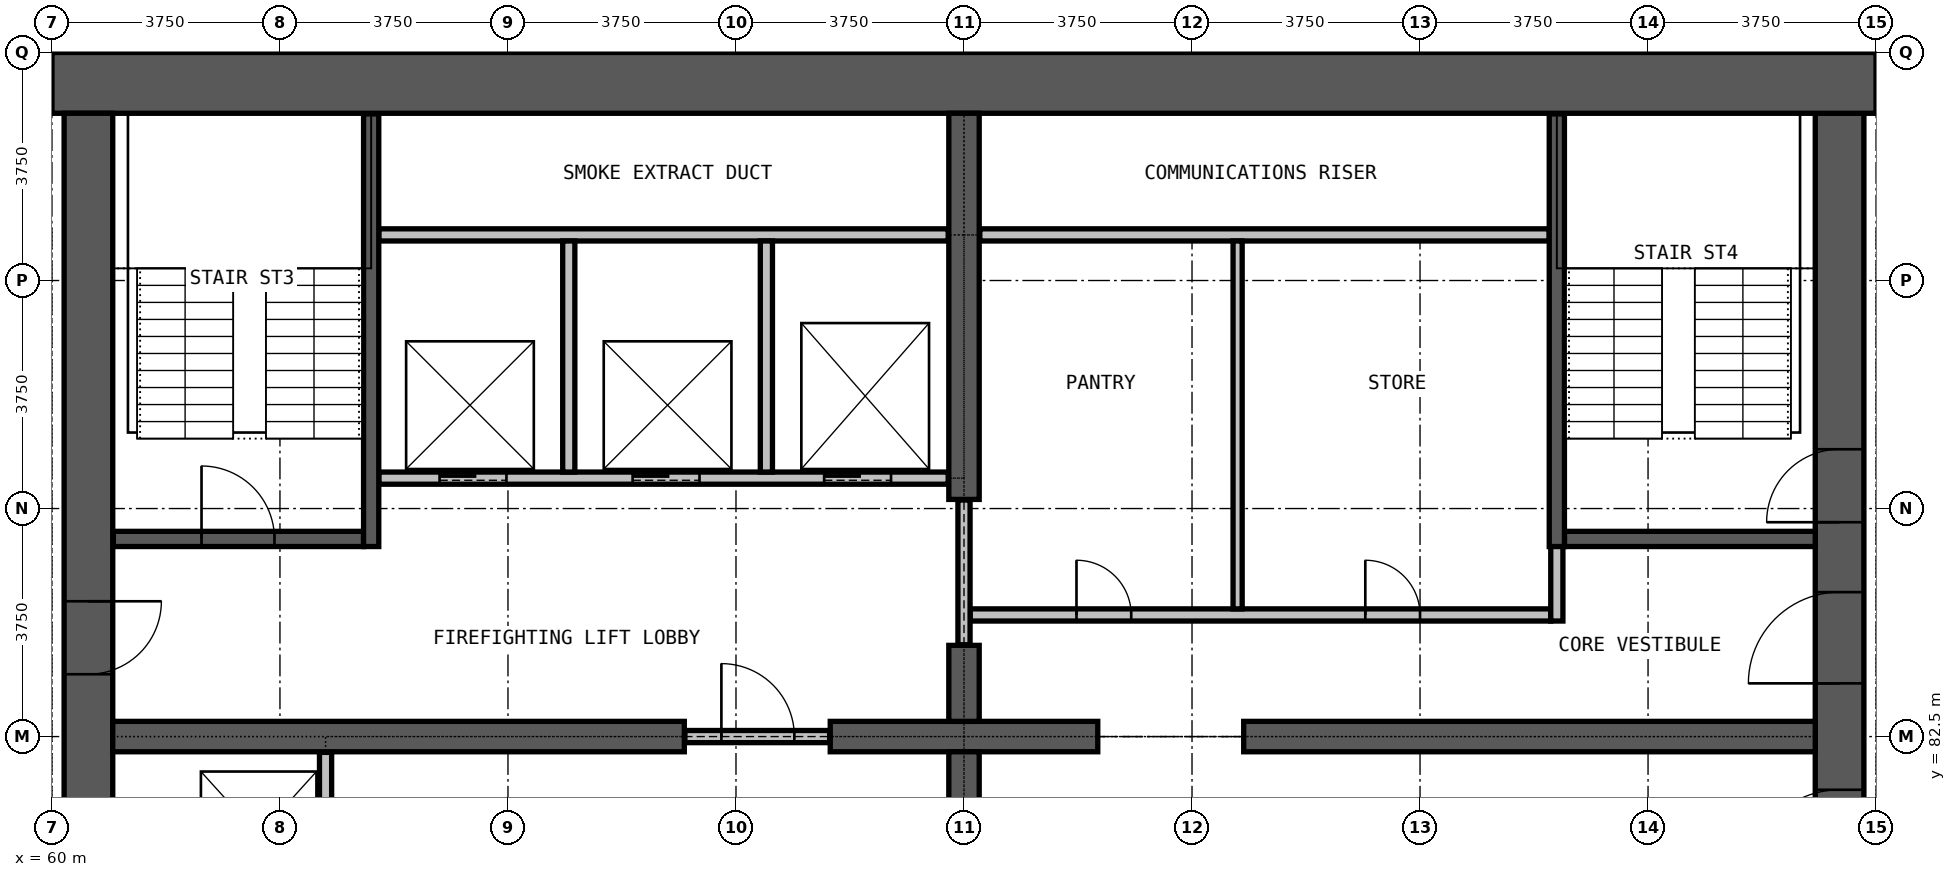
"""IFC4 building model, lengths in metres.
Left out: names, types, materials, properties, quantities, classifications, styles, units other than length and angle.
Written with IfcOpenShell. Run it as: python <this file> out.ifc"""

import sys

from ifc_helpers import new_model, si_unit, direction, frame, frame_2d, origin, place, context, subcontext, project, spatial, rectangle, extrude, element, fill, save


model = new_model("IFC4")
c1 = context("Model", 3, precision=1e-05, world=origin(), true_north=direction((0.0, 1.0)))
c2 = subcontext(c1, "Body", "Model", "MODEL_VIEW")
j1 = project(units=[si_unit("LENGTHUNIT", "METRE"), si_unit("PLANEANGLEUNIT", "RADIAN")], contexts=[c1])
p1 = place(None, origin())
s1 = spatial("IfcSite", under=j1, at=p1, CompositionType="ELEMENT")
p2 = place(p1, origin())
s2 = spatial("IfcBuilding", under=s1, at=p2, CompositionType="ELEMENT")
p3 = place(p2, frame((0.0, 0.0, 128.8)))
s3 = spatial("IfcBuildingStorey", under=s2, at=p3, CompositionType="ELEMENT", Elevation=128.8)
p4 = place(p3, frame((89.4, 72.25, 0.0), z_axis=(0.0, 0.0, 1.0), x_axis=(0.0, 1.0, 0.0)))
e1 = element("IfcWall", 1, at=p4, inside=s3, PredefinedType="SHEAR", context=c2, shape_type="SweptSolid", body=[
    extrude(rectangle(XDim=20.5, YDim=0.8, at=frame_2d((10.25, 0.0))), origin(), (0.0, 0.0, 1.0), 3.6),
])
p5 = place(p4, frame((0.275, 0.0, 0.0)))
e2 = element("IfcOpeningElement", 2, at=p5, cuts=e1, PredefinedType="OPENING", context=c2, shape_type="SweptSolid", body=[
    extrude(rectangle(XDim=1.2, YDim=2.2, at=frame_2d((0.6, 1.1))), frame((0.0, 0.41, 0.0), z_axis=(0.0, -1.0, 0.0), x_axis=(1.0, 0.0, 0.0)), (0.0, 0.0, 1.0), 0.82),
])
p6 = place(p4, frame((13.775, 0.0, 0.0)))
e3 = element("IfcOpeningElement", 3, at=p6, cuts=e1, PredefinedType="OPENING", context=c2, shape_type="SweptSolid", body=[
    extrude(rectangle(XDim=1.2, YDim=2.2, at=frame_2d((0.6, 1.1))), frame((0.0, 0.41, 0.0), z_axis=(0.0, -1.0, 0.0), x_axis=(1.0, 0.0, 0.0)), (0.0, 0.0, 1.0), 0.82),
])
p7 = place(p4, frame((7.875, 0.0, 0.0)))
e4 = element("IfcOpeningElement", 4, at=p7, cuts=e1, PredefinedType="OPENING", context=c2, shape_type="SweptSolid", body=[
    extrude(rectangle(XDim=1.5, YDim=2.2, at=frame_2d((0.75, 1.1))), frame((0.0, 0.41, 0.0), z_axis=(0.0, -1.0, 0.0), x_axis=(1.0, 0.0, 0.0)), (0.0, 0.0, 1.0), 0.82),
])
p8 = place(p4, frame((11.125, 0.0, 0.0)))
e5 = element("IfcOpeningElement", 5, at=p8, cuts=e1, PredefinedType="OPENING", context=c2, shape_type="SweptSolid", body=[
    extrude(rectangle(XDim=1.5, YDim=2.2, at=frame_2d((0.75, 1.1))), frame((0.0, 0.41, 0.0), z_axis=(0.0, -1.0, 0.0), x_axis=(1.0, 0.0, 0.0)), (0.0, 0.0, 1.0), 0.82),
])
p9 = place(p3, frame((90.0, 93.25, 0.0), z_axis=(0.0, 0.0, 1.0), x_axis=(-1.0, 0.0, 0.0)))
e6 = element("IfcWall", 6, at=p9, inside=s3, PredefinedType="SHEAR", context=c2, shape_type="SweptSolid", body=[
    extrude(rectangle(XDim=30.0, YDim=1.0, at=frame_2d((15.0, 0.0))), origin(), (0.0, 0.0, 1.0), 3.6),
])
p10 = place(p3, frame((60.6, 92.75, 0.0), z_axis=(0.0, 0.0, 1.0), x_axis=(0.0, -1.0, 0.0)))
e7 = element("IfcWall", 7, at=p10, inside=s3, PredefinedType="SHEAR", context=c2, shape_type="SweptSolid", body=[
    extrude(rectangle(XDim=20.5, YDim=0.8, at=frame_2d((10.25, 0.0))), origin(), (0.0, 0.0, 1.0), 3.6),
])
p11 = place(p10, frame((19.025, 0.0, 0.0)))
e8 = element("IfcOpeningElement", 8, at=p11, cuts=e7, PredefinedType="OPENING", context=c2, shape_type="SweptSolid", body=[
    extrude(rectangle(XDim=1.2, YDim=2.2, at=frame_2d((0.6, 1.1))), frame((0.0, 0.41, 0.0), z_axis=(0.0, -1.0, 0.0), x_axis=(1.0, 0.0, 0.0)), (0.0, 0.0, 1.0), 0.82),
])
p12 = place(p10, frame((8.025, 0.0, 0.0)))
e9 = element("IfcOpeningElement", 9, at=p12, cuts=e7, PredefinedType="OPENING", context=c2, shape_type="SweptSolid", body=[
    extrude(rectangle(XDim=1.2, YDim=2.2, at=frame_2d((0.6, 1.1))), frame((0.0, 0.41, 0.0), z_axis=(0.0, -1.0, 0.0), x_axis=(1.0, 0.0, 0.0)), (0.0, 0.0, 1.0), 0.82),
])
p13 = place(p3, frame((61.0, 82.5, 0.0), z_axis=(0.0, 0.0, 1.0), x_axis=(1.0, 0.0, 0.0)))
e10 = element("IfcWall", 10, at=p13, inside=s3, PredefinedType="SHEAR", context=c2, shape_type="SweptSolid", body=[
    extrude(rectangle(XDim=9.4, YDim=0.5, at=frame_2d((4.7, 0.0))), origin(), (0.0, 0.0, 1.0), 3.6),
])
p14 = place(p3, frame((72.8, 82.5, 0.0), z_axis=(0.0, 0.0, 1.0), x_axis=(1.0, 0.0, 0.0)))
e11 = element("IfcWall", 11, at=p14, inside=s3, PredefinedType="SHEAR", context=c2, shape_type="SweptSolid", body=[
    extrude(rectangle(XDim=4.4, YDim=0.5, at=frame_2d((2.2, 0.0))), origin(), (0.0, 0.0, 1.0), 3.6),
])
p15 = place(p3, frame((79.6, 82.5, 0.0), z_axis=(0.0, 0.0, 1.0), x_axis=(1.0, 0.0, 0.0)))
e12 = element("IfcWall", 12, at=p15, inside=s3, PredefinedType="SHEAR", context=c2, shape_type="SweptSolid", body=[
    extrude(rectangle(XDim=9.4, YDim=0.5, at=frame_2d((4.7, 0.0))), origin(), (0.0, 0.0, 1.0), 3.6),
])
for number, where, z_axis, x_axis in (
    (13, (75.0, 81.0, 0.0), (0.0, 0.0, 1.0), (0.0, 1.0, 0.0)),
    (14, (75.0, 82.75, 0.0), (0.0, 0.0, 1.0), (0.0, 1.0, 0.0)),
):
    element("IfcWall", number, at=place(p3, frame(where, z_axis=z_axis, x_axis=x_axis)), inside=s3, PredefinedType="SHEAR", context=c2, shape_type="SweptSolid", body=[
        extrude(rectangle(XDim=1.25, YDim=0.5, at=frame_2d((0.625, 0.0))), origin(), (0.0, 0.0, 1.0), 3.6),
    ])
p16 = place(p3, frame((75.0, 86.4, 0.0), z_axis=(0.0, 0.0, 1.0), x_axis=(0.0, 1.0, 0.0)))
e15 = element("IfcWall", 15, at=p16, inside=s3, PredefinedType="SHEAR", context=c2, shape_type="SweptSolid", body=[
    extrude(rectangle(XDim=6.35, YDim=0.5, at=frame_2d((3.175, 0.0))), origin(), (0.0, 0.0, 1.0), 3.6),
])
p17 = place(p3, frame((70.41, 82.5, 0.0), z_axis=(0.0, 0.0, 1.0), x_axis=(1.0, 0.0, 0.0)))
e16 = element("IfcWall", 16, at=p17, inside=s3, PredefinedType="PARTITIONING", context=c2, shape_type="SweptSolid", body=[
    extrude(rectangle(XDim=2.38, YDim=0.2, at=frame_2d((1.19, 0.0))), origin(), (0.0, 0.0, 1.0), 2.4),
])
p18 = place(p17, frame((0.6, 0.0, 0.0)))
e17 = element("IfcOpeningElement", 17, at=p18, cuts=e16, PredefinedType="OPENING", context=c2, shape_type="SweptSolid", body=[
    extrude(rectangle(XDim=1.2, YDim=2.2, at=frame_2d((0.6, 1.1))), frame((0.0, 0.11, 0.0), z_axis=(0.0, -1.0, 0.0), x_axis=(1.0, 0.0, 0.0)), (0.0, 0.0, 1.0), 0.22),
])
p19 = place(p3, frame((75.1, 84.5, 0.0), z_axis=(0.0, 0.0, 1.0), x_axis=(1.0, 0.0, 0.0)))
e18 = element("IfcWall", 18, at=p19, inside=s3, PredefinedType="PARTITIONING", context=c2, shape_type="SweptSolid", body=[
    extrude(rectangle(XDim=9.55, YDim=0.2, at=frame_2d((4.775, 0.0))), origin(), (0.0, 0.0, 1.0), 3.3),
])
p20 = place(p19, frame((1.75, 0.0, 0.0)))
e19 = element("IfcOpeningElement", 19, at=p20, cuts=e18, PredefinedType="OPENING", context=c2, shape_type="SweptSolid", body=[
    extrude(rectangle(XDim=0.9, YDim=2.2, at=frame_2d((0.45, 1.1))), frame((0.0, 0.11, 0.0), z_axis=(0.0, -1.0, 0.0), x_axis=(1.0, 0.0, 0.0)), (0.0, 0.0, 1.0), 0.22),
])
p21 = place(p19, frame((6.5, 0.0, 0.0)))
e20 = element("IfcOpeningElement", 20, at=p21, cuts=e18, PredefinedType="OPENING", context=c2, shape_type="SweptSolid", body=[
    extrude(rectangle(XDim=0.9, YDim=2.2, at=frame_2d((0.45, 1.1))), frame((0.0, 0.11, 0.0), z_axis=(0.0, -1.0, 0.0), x_axis=(1.0, 0.0, 0.0)), (0.0, 0.0, 1.0), 0.22),
])
p22 = place(p3, frame((75.26, 90.75, 0.0), z_axis=(0.0, 0.0, 1.0), x_axis=(1.0, 0.0, 0.0)))
e21 = element("IfcWall", 21, at=p22, inside=s3, PredefinedType="PARTITIONING", context=c2, shape_type="SweptSolid", body=[
    extrude(rectangle(XDim=9.365, YDim=0.2, at=frame_2d((4.683, 0.0))), origin(), (0.0, 0.0, 1.0), 3.3),
])
p23 = place(p3, frame((75.0, 84.01, 0.0), z_axis=(0.0, 0.0, 1.0), x_axis=(0.0, 1.0, 0.0)))
e22 = element("IfcWall", 22, at=p23, inside=s3, PredefinedType="PARTITIONING", context=c2, shape_type="SweptSolid", body=[
    extrude(rectangle(XDim=2.38, YDim=0.2, at=frame_2d((1.19, 0.0))), origin(), (0.0, 0.0, 1.0), 2.4),
])
p24 = place(p3, frame((84.75, 84.4, 0.0), z_axis=(0.0, 0.0, 1.0), x_axis=(0.0, 1.0, 0.0)))
e23 = element("IfcWall", 23, at=p24, inside=s3, PredefinedType="PARTITIONING", context=c2, shape_type="SweptSolid", body=[
    extrude(rectangle(XDim=1.475, YDim=0.2, at=frame_2d((0.738, 0.0))), origin(), (0.0, 0.0, 1.0), 3.3),
])
p25 = place(p3, frame((79.5, 84.6, 0.0), z_axis=(0.0, 0.0, 1.0), x_axis=(0.0, 1.0, 0.0)))
e24 = element("IfcWall", 24, at=p25, inside=s3, PredefinedType="PARTITIONING", context=c2, shape_type="SweptSolid", body=[
    extrude(rectangle(XDim=6.05, YDim=0.15, at=frame_2d((3.025, 0.0))), origin(), (0.0, 0.0, 1.0), 3.3),
])
p26 = place(p3, frame((65.375, 86.75, 0.0), z_axis=(0.0, 0.0, 1.0), x_axis=(1.0, 0.0, 0.0)))
e25 = element("IfcWall", 25, at=p26, inside=s3, PredefinedType="PARTITIONING", context=c2, shape_type="SweptSolid", body=[
    extrude(rectangle(XDim=9.365, YDim=0.2, at=frame_2d((4.683, 0.0))), origin(), (0.0, 0.0, 1.0), 3.3),
])
p27 = place(p26, frame((1.0, 0.0, 0.0)))
e26 = element("IfcOpeningElement", 26, at=p27, cuts=e25, PredefinedType="OPENING", context=c2, shape_type="SweptSolid", body=[
    extrude(rectangle(XDim=1.1, YDim=2.2, at=frame_2d((0.55, 1.1))), frame((0.0, 0.11, 0.0), z_axis=(0.0, -1.0, 0.0), x_axis=(1.0, 0.0, 0.0)), (0.0, 0.0, 1.0), 0.22),
])
p28 = place(p26, frame((4.175, 0.0, 0.0)))
e27 = element("IfcOpeningElement", 27, at=p28, cuts=e25, PredefinedType="OPENING", context=c2, shape_type="SweptSolid", body=[
    extrude(rectangle(XDim=1.1, YDim=2.2, at=frame_2d((0.55, 1.1))), frame((0.0, 0.11, 0.0), z_axis=(0.0, -1.0, 0.0), x_axis=(1.0, 0.0, 0.0)), (0.0, 0.0, 1.0), 0.22),
])
p29 = place(p26, frame((7.325, 0.0, 0.0)))
e28 = element("IfcOpeningElement", 28, at=p29, cuts=e25, PredefinedType="OPENING", context=c2, shape_type="SweptSolid", body=[
    extrude(rectangle(XDim=1.1, YDim=2.2, at=frame_2d((0.55, 1.1))), frame((0.0, 0.11, 0.0), z_axis=(0.0, -1.0, 0.0), x_axis=(1.0, 0.0, 0.0)), (0.0, 0.0, 1.0), 0.22),
])
p30 = place(p3, frame((65.375, 90.75, 0.0), z_axis=(0.0, 0.0, 1.0), x_axis=(1.0, 0.0, 0.0)))
e29 = element("IfcWall", 29, at=p30, inside=s3, PredefinedType="PARTITIONING", context=c2, shape_type="SweptSolid", body=[
    extrude(rectangle(XDim=9.365, YDim=0.2, at=frame_2d((4.683, 0.0))), origin(), (0.0, 0.0, 1.0), 3.3),
])
p31 = place(p3, frame((64.5, 79.375, 0.0), z_axis=(0.0, 0.0, 1.0), x_axis=(0.0, 1.0, 0.0)))
e30 = element("IfcWall", 30, at=p31, inside=s3, PredefinedType="PARTITIONING", context=c2, shape_type="SweptSolid", body=[
    extrude(rectangle(XDim=2.865, YDim=0.2, at=frame_2d((1.433, 0.0))), origin(), (0.0, 0.0, 1.0), 3.3),
])
for number, where, z_axis, x_axis in (
    (31, (68.5, 86.85, 0.0), (0.0, 0.0, 1.0), (0.0, 1.0, 0.0)),
    (32, (71.75, 86.85, 0.0), (0.0, 0.0, 1.0), (0.0, 1.0, 0.0)),
):
    element("IfcWall", number, at=place(p3, frame(where, z_axis=z_axis, x_axis=x_axis)), inside=s3, PredefinedType="PARTITIONING", context=c2, shape_type="SweptSolid", body=[
        extrude(rectangle(XDim=3.8, YDim=0.2, at=frame_2d((1.9, 0.0))), origin(), (0.0, 0.0, 1.0), 3.3),
    ])
p32 = place(p3, frame((61.01, 85.75, 0.0), z_axis=(0.0, 0.0, 1.0), x_axis=(1.0, 0.0, 0.0)))
e33 = element("IfcWall", 33, at=p32, inside=s3, PredefinedType="PARTITIONING", context=c2, shape_type="SweptSolid", body=[
    extrude(rectangle(XDim=4.115, YDim=0.25, at=frame_2d((2.058, 0.0))), origin(), (0.0, 0.0, 1.0), 3.3),
])
p33 = place(p32, frame((1.45, 0.0, 0.0)))
e34 = element("IfcOpeningElement", 34, at=p33, cuts=e33, PredefinedType="OPENING", context=c2, shape_type="SweptSolid", body=[
    extrude(rectangle(XDim=1.2, YDim=2.2, at=frame_2d((0.6, 1.1))), frame((0.0, 0.135, 0.0), z_axis=(0.0, -1.0, 0.0), x_axis=(1.0, 0.0, 0.0)), (0.0, 0.0, 1.0), 0.27),
])
p34 = place(p3, frame((84.875, 85.75, 0.0), z_axis=(0.0, 0.0, 1.0), x_axis=(1.0, 0.0, 0.0)))
e35 = element("IfcWall", 35, at=p34, inside=s3, PredefinedType="PARTITIONING", context=c2, shape_type="SweptSolid", body=[
    extrude(rectangle(XDim=4.125, YDim=0.25, at=frame_2d((2.062, 0.0))), origin(), (0.0, 0.0, 1.0), 3.3),
])
for number, where, z_axis, x_axis in (
    (36, (65.25, 85.625, 0.0), (0.0, 0.0, 1.0), (0.0, 1.0, 0.0)),
    (37, (84.75, 85.625, 0.0), (0.0, 0.0, 1.0), (0.0, 1.0, 0.0)),
):
    element("IfcWall", number, at=place(p3, frame(where, z_axis=z_axis, x_axis=x_axis)), inside=s3, PredefinedType="PARTITIONING", context=c2, shape_type="SweptSolid", body=[
        extrude(rectangle(XDim=7.115, YDim=0.25, at=frame_2d((3.558, 0.0))), origin(), (0.0, 0.0, 1.0), 3.3),
    ])
p35 = place(p27, origin())
e38 = element("IfcDoor", 38, at=p35, inside=s3, OperationType="DOUBLE_DOOR_SLIDING", PredefinedType="DOOR", context=c2, shape_type="SweptSolid", body=[
    extrude(rectangle(XDim=1.1, YDim=2.2, at=frame_2d((0.55, 1.1))), frame((0.0, 0.025, 0.0), z_axis=(0.0, -1.0, 0.0), x_axis=(1.0, 0.0, 0.0)), (0.0, 0.0, 1.0), 0.05),
])
fill(e26, e38)
p36 = place(p28, origin())
e39 = element("IfcDoor", 39, at=p36, inside=s3, OperationType="DOUBLE_DOOR_SLIDING", PredefinedType="DOOR", context=c2, shape_type="SweptSolid", body=[
    extrude(rectangle(XDim=1.1, YDim=2.2, at=frame_2d((0.55, 1.1))), frame((0.0, 0.025, 0.0), z_axis=(0.0, -1.0, 0.0), x_axis=(1.0, 0.0, 0.0)), (0.0, 0.0, 1.0), 0.05),
])
fill(e27, e39)
p37 = place(p29, origin())
e40 = element("IfcDoor", 40, at=p37, inside=s3, OperationType="DOUBLE_DOOR_SLIDING", PredefinedType="DOOR", context=c2, shape_type="SweptSolid", body=[
    extrude(rectangle(XDim=1.1, YDim=2.2, at=frame_2d((0.55, 1.1))), frame((0.0, 0.025, 0.0), z_axis=(0.0, -1.0, 0.0), x_axis=(1.0, 0.0, 0.0)), (0.0, 0.0, 1.0), 0.05),
])
fill(e28, e40)
p38 = place(p18, origin())
e41 = element("IfcDoor", 41, at=p38, inside=s3, OperationType="SINGLE_SWING_LEFT", PredefinedType="DOOR", context=c2, shape_type="SweptSolid", body=[
    extrude(rectangle(XDim=1.2, YDim=2.2, at=frame_2d((0.6, 1.1))), frame((0.0, 0.025, 0.0), z_axis=(0.0, -1.0, 0.0), x_axis=(1.0, 0.0, 0.0)), (0.0, 0.0, 1.0), 0.05),
])
fill(e17, e41)
p39 = place(p33, origin())
e42 = element("IfcDoor", 42, at=p39, inside=s3, OperationType="SINGLE_SWING_LEFT", PredefinedType="DOOR", context=c2, shape_type="SweptSolid", body=[
    extrude(rectangle(XDim=1.2, YDim=2.2, at=frame_2d((0.6, 1.1))), frame((0.0, 0.025, 0.0), z_axis=(0.0, -1.0, 0.0), x_axis=(1.0, 0.0, 0.0)), (0.0, 0.0, 1.0), 0.05),
])
fill(e34, e42)
p40 = place(p6, origin())
e43 = element("IfcDoor", 43, at=p40, inside=s3, OperationType="SINGLE_SWING_RIGHT", PredefinedType="DOOR", context=c2, shape_type="SweptSolid", body=[
    extrude(rectangle(XDim=1.2, YDim=2.2, at=frame_2d((0.6, 1.1))), frame((0.0, 0.025, 0.0), z_axis=(0.0, -1.0, 0.0), x_axis=(1.0, 0.0, 0.0)), (0.0, 0.0, 1.0), 0.05),
])
fill(e3, e43)
p41 = place(p7, origin())
e44 = element("IfcDoor", 44, at=p41, inside=s3, OperationType="DOUBLE_DOOR_SINGLE_SWING", PredefinedType="DOOR", context=c2, shape_type="SweptSolid", body=[
    extrude(rectangle(XDim=1.5, YDim=2.2, at=frame_2d((0.75, 1.1))), frame((0.0, 0.025, 0.0), z_axis=(0.0, -1.0, 0.0), x_axis=(1.0, 0.0, 0.0)), (0.0, 0.0, 1.0), 0.05),
])
fill(e4, e44)
p42 = place(p12, origin())
e45 = element("IfcDoor", 45, at=p42, inside=s3, OperationType="SINGLE_SWING_RIGHT", PredefinedType="DOOR", context=c2, shape_type="SweptSolid", body=[
    extrude(rectangle(XDim=1.2, YDim=2.2, at=frame_2d((0.6, 1.1))), frame((0.0, 0.025, 0.0), z_axis=(0.0, -1.0, 0.0), x_axis=(1.0, 0.0, 0.0)), (0.0, 0.0, 1.0), 0.05),
])
fill(e9, e45)
p43 = place(p8, origin())
e46 = element("IfcDoor", 46, at=p43, inside=s3, OperationType="DOUBLE_DOOR_SINGLE_SWING", PredefinedType="DOOR", context=c2, shape_type="SweptSolid", body=[
    extrude(rectangle(XDim=1.5, YDim=2.2, at=frame_2d((0.75, 1.1))), frame((0.0, 0.025, 0.0), z_axis=(0.0, -1.0, 0.0), x_axis=(1.0, 0.0, 0.0)), (0.0, 0.0, 1.0), 0.05),
])
fill(e5, e46)
p44 = place(p20, origin())
e47 = element("IfcDoor", 47, at=p44, inside=s3, OperationType="SINGLE_SWING_RIGHT", PredefinedType="DOOR", context=c2, shape_type="SweptSolid", body=[
    extrude(rectangle(XDim=0.9, YDim=2.2, at=frame_2d((0.45, 1.1))), frame((0.0, 0.025, 0.0), z_axis=(0.0, -1.0, 0.0), x_axis=(1.0, 0.0, 0.0)), (0.0, 0.0, 1.0), 0.05),
])
fill(e19, e47)
p45 = place(p21, origin())
e48 = element("IfcDoor", 48, at=p45, inside=s3, OperationType="SINGLE_SWING_LEFT", PredefinedType="DOOR", context=c2, shape_type="SweptSolid", body=[
    extrude(rectangle(XDim=0.9, YDim=2.2, at=frame_2d((0.45, 1.1))), frame((0.0, 0.025, 0.0), z_axis=(0.0, -1.0, 0.0), x_axis=(1.0, 0.0, 0.0)), (0.0, 0.0, 1.0), 0.05),
])
fill(e20, e48)
save(model, sys.argv[1])
